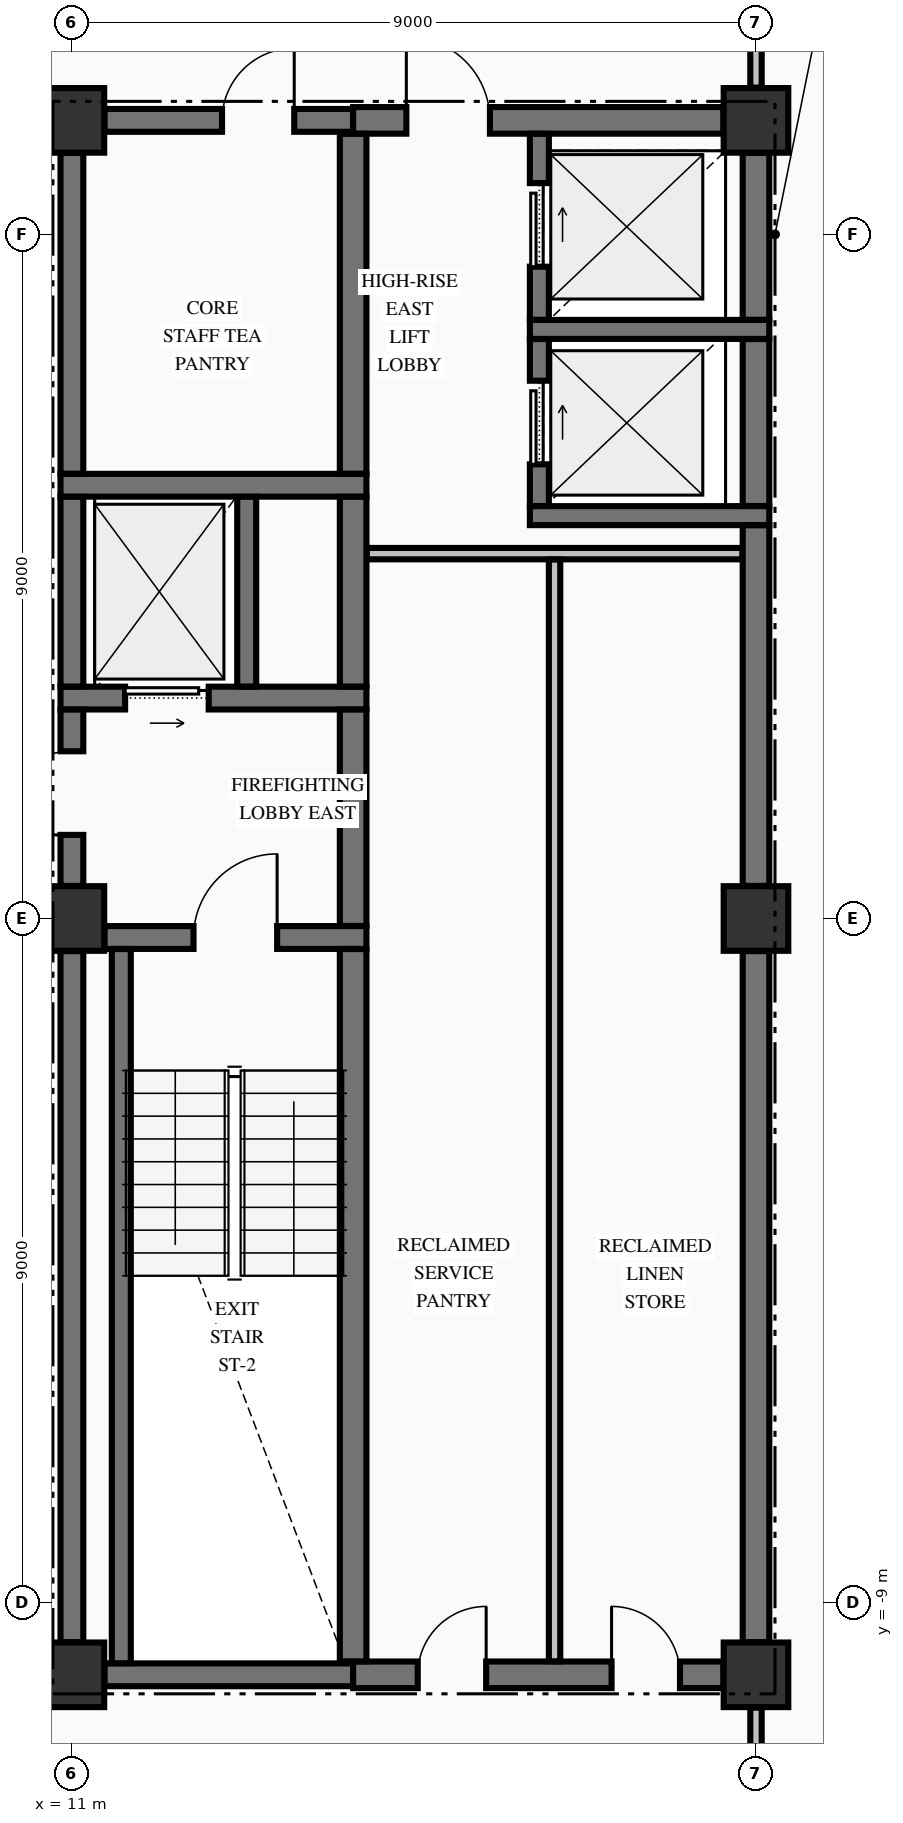
"""IFC4 building model, lengths in metres.
Left out: names, types, materials, properties, quantities, classifications, styles, units other than length and angle.
Written with IfcOpenShell. Run it as: python <this file> out.ifc"""

import sys

from ifc_helpers import new_model, si_unit, direction, frame, frame_2d, origin, origin_2d, place, context, subcontext, project, spatial, rectangle, extrude, element, fill, save


model = new_model("IFC4")
c1 = context("Model", 3, precision=1e-05, world=origin(), true_north=direction((0.0, 1.0)))
c2 = subcontext(c1, "Body", "Model", "MODEL_VIEW")
j1 = project(units=[si_unit("LENGTHUNIT", "METRE"), si_unit("PLANEANGLEUNIT", "RADIAN")], contexts=[c1])
p1 = place(None, origin())
s1 = spatial("IfcSite", under=j1, at=p1, CompositionType="ELEMENT")
p2 = place(p1, origin())
s2 = spatial("IfcBuilding", under=s1, at=p2, CompositionType="ELEMENT")
p3 = place(p2, frame((0.0, 0.0, 198.26)))
s3 = spatial("IfcBuildingStorey", under=s2, at=p3, CompositionType="ELEMENT", Elevation=198.26)
for number, where, z_axis, x_axis in (
    (1, (11.0, -9.95, -0.25), (0.0, 0.0, 1.0), (1.0, 0.0, 0.0)),
    (2, (11.0, 0.0, -0.25), (0.0, 0.0, 1.0), (1.0, 0.0, 0.0)),
    (3, (11.0, 10.5, -0.25), (0.0, 0.0, 1.0), (1.0, 0.0, 0.0)),
    (4, (20.0, -9.95, -0.25), (0.0, 0.0, 1.0), (1.0, 0.0, 0.0)),
    (5, (20.0, 10.5, -0.25), (0.0, 0.0, 1.0), (1.0, 0.0, 0.0)),
    (6, (20.0, 0.0, -0.25), (0.0, 0.0, 1.0), (1.0, 0.0, 0.0)),
):
    element("IfcColumn", number, at=place(p3, frame(where, z_axis=z_axis, x_axis=x_axis)), inside=s3, PredefinedType="COLUMN", context=c2, shape_type="SweptSolid", body=[
        extrude(rectangle(XDim=0.85, YDim=0.85, at=origin_2d()), origin(), (0.0, 0.0, 1.0), 3.4),
    ])
p4 = place(p3, frame((11.429, -9.95, 0.0), z_axis=(0.0, 0.0, 1.0), x_axis=(1.0, 0.0, 0.0)))
e7 = element("IfcWall", 7, at=p4, inside=s3, PredefinedType="SHEAR", context=c2, shape_type="SweptSolid", body=[
    extrude(rectangle(XDim=3.271, YDim=0.3, at=frame_2d((1.635, 0.0))), origin(), (0.0, 0.0, 1.0), 3.15),
])
p5 = place(p3, frame((14.7, -9.95, 0.0), z_axis=(0.0, 0.0, 1.0), x_axis=(1.0, 0.0, 0.0)))
e8 = element("IfcWall", 8, at=p5, inside=s3, PredefinedType="SHEAR", context=c2, shape_type="SweptSolid", body=[
    extrude(rectangle(XDim=4.871, YDim=0.35, at=frame_2d((2.436, 0.0))), origin(), (0.0, 0.0, 1.0), 3.15),
])
p6 = place(p5, frame((0.85, 0.0, 0.0)))
e9 = element("IfcOpeningElement", 9, at=p6, cuts=e8, PredefinedType="OPENING", context=c2, shape_type="SweptSolid", body=[
    extrude(rectangle(XDim=0.9, YDim=2.15, at=frame_2d((0.45, 1.075))), frame((0.0, 0.185, 0.0), z_axis=(0.0, -1.0, 0.0), x_axis=(1.0, 0.0, 0.0)), (0.0, 0.0, 1.0), 0.37),
])
p7 = place(p5, frame((3.4, 0.0, 0.0)))
e10 = element("IfcOpeningElement", 10, at=p7, cuts=e8, PredefinedType="OPENING", context=c2, shape_type="SweptSolid", body=[
    extrude(rectangle(XDim=0.9, YDim=2.15, at=frame_2d((0.45, 1.075))), frame((0.0, 0.185, 0.0), z_axis=(0.0, -1.0, 0.0), x_axis=(1.0, 0.0, 0.0)), (0.0, 0.0, 1.0), 0.37),
])
p8 = place(p3, frame((11.429, -0.25, 0.0), z_axis=(0.0, 0.0, 1.0), x_axis=(1.0, 0.0, 0.0)))
e11 = element("IfcWall", 11, at=p8, inside=s3, PredefinedType="SHEAR", context=c2, shape_type="SweptSolid", body=[
    extrude(rectangle(XDim=3.446, YDim=0.3, at=frame_2d((1.723, 0.0))), origin(), (0.0, 0.0, 1.0), 3.15),
])
p9 = place(p8, frame((1.171, 0.0, 0.0)))
e12 = element("IfcOpeningElement", 12, at=p9, cuts=e11, PredefinedType="OPENING", context=c2, shape_type="SweptSolid", body=[
    extrude(rectangle(XDim=1.1, YDim=2.15, at=frame_2d((0.55, 1.075))), frame((0.0, 0.16, 0.0), z_axis=(0.0, -1.0, 0.0), x_axis=(1.0, 0.0, 0.0)), (0.0, 0.0, 1.0), 0.32),
])
p10 = place(p3, frame((10.85, 2.9, 0.0), z_axis=(0.0, 0.0, 1.0), x_axis=(1.0, 0.0, 0.0)))
e13 = element("IfcWall", 13, at=p10, inside=s3, PredefinedType="SHEAR", context=c2, shape_type="SweptSolid", body=[
    extrude(rectangle(XDim=4.025, YDim=0.3, at=frame_2d((2.012, 0.0))), origin(), (0.0, 0.0, 1.0), 3.15),
])
p11 = place(p10, frame((0.85, 0.0, 0.0)))
e14 = element("IfcOpeningElement", 14, at=p11, cuts=e13, PredefinedType="OPENING", context=c2, shape_type="SweptSolid", body=[
    extrude(rectangle(XDim=1.1, YDim=2.2, at=frame_2d((0.55, 1.1))), frame((0.0, 0.16, 0.0), z_axis=(0.0, -1.0, 0.0), x_axis=(1.0, 0.0, 0.0)), (0.0, 0.0, 1.0), 0.32),
])
p12 = place(p3, frame((17.025, 5.3, 0.0), z_axis=(0.0, 0.0, 1.0), x_axis=(1.0, 0.0, 0.0)))
e15 = element("IfcWall", 15, at=p12, inside=s3, PredefinedType="SOLIDWALL", context=c2, shape_type="SweptSolid", body=[
    extrude(rectangle(XDim=3.15, YDim=0.25, at=frame_2d((1.575, 0.0))), origin(), (0.0, 0.0, 1.0), 3.15),
])
p13 = place(p3, frame((10.85, 5.7, 0.0), z_axis=(0.0, 0.0, 1.0), x_axis=(1.0, 0.0, 0.0)))
e16 = element("IfcWall", 16, at=p13, inside=s3, PredefinedType="SHEAR", context=c2, shape_type="SweptSolid", body=[
    extrude(rectangle(XDim=4.025, YDim=0.3, at=frame_2d((2.012, 0.0))), origin(), (0.0, 0.0, 1.0), 3.15),
])
p14 = place(p3, frame((17.025, 7.75, 0.0), z_axis=(0.0, 0.0, 1.0), x_axis=(1.0, 0.0, 0.0)))
e17 = element("IfcWall", 17, at=p14, inside=s3, PredefinedType="SOLIDWALL", context=c2, shape_type="SweptSolid", body=[
    extrude(rectangle(XDim=3.15, YDim=0.25, at=frame_2d((1.575, 0.0))), origin(), (0.0, 0.0, 1.0), 3.15),
])
p15 = place(p3, frame((11.429, 10.5, 0.0), z_axis=(0.0, 0.0, 1.0), x_axis=(1.0, 0.0, 0.0)))
e18 = element("IfcWall", 18, at=p15, inside=s3, PredefinedType="SHEAR", context=c2, shape_type="SweptSolid", body=[
    extrude(rectangle(XDim=3.271, YDim=0.3, at=frame_2d((1.635, 0.0))), origin(), (0.0, 0.0, 1.0), 3.15),
])
p16 = place(p15, frame((1.546, 0.0, 0.0)))
e19 = element("IfcOpeningElement", 19, at=p16, cuts=e18, PredefinedType="OPENING", context=c2, shape_type="SweptSolid", body=[
    extrude(rectangle(XDim=0.95, YDim=2.15, at=frame_2d((0.475, 1.075))), frame((0.0, 0.16, 0.0), z_axis=(0.0, -1.0, 0.0), x_axis=(1.0, 0.0, 0.0)), (0.0, 0.0, 1.0), 0.32),
])
p17 = place(p3, frame((14.7, 10.5, 0.0), z_axis=(0.0, 0.0, 1.0), x_axis=(1.0, 0.0, 0.0)))
e20 = element("IfcWall", 20, at=p17, inside=s3, PredefinedType="SHEAR", context=c2, shape_type="SweptSolid", body=[
    extrude(rectangle(XDim=4.871, YDim=0.35, at=frame_2d((2.436, 0.0))), origin(), (0.0, 0.0, 1.0), 3.15),
])
p18 = place(p17, frame((0.7, 0.0, 0.0)))
e21 = element("IfcOpeningElement", 21, at=p18, cuts=e20, PredefinedType="OPENING", context=c2, shape_type="SweptSolid", body=[
    extrude(rectangle(XDim=1.1, YDim=2.15, at=frame_2d((0.55, 1.075))), frame((0.0, 0.185, 0.0), z_axis=(0.0, -1.0, 0.0), x_axis=(1.0, 0.0, 0.0)), (0.0, 0.0, 1.0), 0.37),
])
p19 = place(p3, frame((14.878, 4.8, 0.0), z_axis=(0.0, 0.0, 1.0), x_axis=(1.0, 0.0, 0.0)))
e22 = element("IfcWall", 22, at=p19, inside=s3, PredefinedType="PARTITIONING", context=c2, shape_type="SweptSolid", body=[
    extrude(rectangle(XDim=4.944, YDim=0.15, at=frame_2d((2.472, 0.0))), origin(), (0.0, 0.0, 1.0), 3.15),
])
p20 = place(p3, frame((11.0, -9.521, 0.0), z_axis=(0.0, 0.0, 1.0), x_axis=(0.0, 1.0, 0.0)))
e23 = element("IfcWall", 23, at=p20, inside=s3, PredefinedType="SHEAR", context=c2, shape_type="SweptSolid", body=[
    extrude(rectangle(XDim=9.092, YDim=0.3, at=frame_2d((4.546, 0.0))), origin(), (0.0, 0.0, 1.0), 3.15),
])
p21 = place(p3, frame((11.0, 0.429, 0.0), z_axis=(0.0, 0.0, 1.0), x_axis=(0.0, 1.0, 0.0)))
e24 = element("IfcWall", 24, at=p21, inside=s3, PredefinedType="SHEAR", context=c2, shape_type="SweptSolid", body=[
    extrude(rectangle(XDim=2.319, YDim=0.3, at=frame_2d((1.16, 0.0))), origin(), (0.0, 0.0, 1.0), 3.15),
])
p22 = place(p21, frame((0.671, 0.0, 0.0)))
e25 = element("IfcOpeningElement", 25, at=p22, cuts=e24, PredefinedType="OPENING", context=c2, shape_type="SweptSolid", body=[
    extrude(rectangle(XDim=1.1, YDim=2.15, at=frame_2d((0.55, 1.075))), frame((0.0, 0.16, 0.0), z_axis=(0.0, -1.0, 0.0), x_axis=(1.0, 0.0, 0.0)), (0.0, 0.0, 1.0), 0.32),
])
p23 = place(p3, frame((11.0, 3.052, 0.0), z_axis=(0.0, 0.0, 1.0), x_axis=(0.0, 1.0, 0.0)))
e26 = element("IfcWall", 26, at=p23, inside=s3, PredefinedType="SHEAR", context=c2, shape_type="SweptSolid", body=[
    extrude(rectangle(XDim=2.496, YDim=0.3, at=frame_2d((1.248, 0.0))), origin(), (0.0, 0.0, 1.0), 3.15),
])
p24 = place(p3, frame((11.0, 5.852, 0.0), z_axis=(0.0, 0.0, 1.0), x_axis=(0.0, 1.0, 0.0)))
e27 = element("IfcWall", 27, at=p24, inside=s3, PredefinedType="SHEAR", context=c2, shape_type="SweptSolid", body=[
    extrude(rectangle(XDim=4.219, YDim=0.3, at=frame_2d((2.109, 0.0))), origin(), (0.0, 0.0, 1.0), 3.15),
])
p25 = place(p3, frame((11.65, -9.798, 0.0), z_axis=(0.0, 0.0, 1.0), x_axis=(0.0, 1.0, 0.0)))
e28 = element("IfcWall", 28, at=p25, inside=s3, PredefinedType="SOLIDWALL", context=c2, shape_type="SweptSolid", body=[
    extrude(rectangle(XDim=9.396, YDim=0.25, at=frame_2d((4.698, 0.0))), origin(), (0.0, 0.0, 1.0), 3.15),
])
p26 = place(p3, frame((13.3, 3.052, 0.0), z_axis=(0.0, 0.0, 1.0), x_axis=(0.0, 1.0, 0.0)))
e29 = element("IfcWall", 29, at=p26, inside=s3, PredefinedType="SOLIDWALL", context=c2, shape_type="SweptSolid", body=[
    extrude(rectangle(XDim=2.496, YDim=0.25, at=frame_2d((1.248, 0.0))), origin(), (0.0, 0.0, 1.0), 3.15),
])
p27 = place(p3, frame((14.7, -9.773, 0.0), z_axis=(0.0, 0.0, 1.0), x_axis=(0.0, 1.0, 0.0)))
e30 = element("IfcWall", 30, at=p27, inside=s3, PredefinedType="SHEAR", context=c2, shape_type="SweptSolid", body=[
    extrude(rectangle(XDim=9.371, YDim=0.35, at=frame_2d((4.686, 0.0))), origin(), (0.0, 0.0, 1.0), 3.15),
])
p28 = place(p3, frame((14.7, -0.098, 0.0), z_axis=(0.0, 0.0, 1.0), x_axis=(0.0, 1.0, 0.0)))
e31 = element("IfcWall", 31, at=p28, inside=s3, PredefinedType="SHEAR", context=c2, shape_type="SweptSolid", body=[
    extrude(rectangle(XDim=2.846, YDim=0.35, at=frame_2d((1.423, 0.0))), origin(), (0.0, 0.0, 1.0), 3.15),
])
p29 = place(p3, frame((14.7, 3.052, 0.0), z_axis=(0.0, 0.0, 1.0), x_axis=(0.0, 1.0, 0.0)))
e32 = element("IfcWall", 32, at=p29, inside=s3, PredefinedType="SHEAR", context=c2, shape_type="SweptSolid", body=[
    extrude(rectangle(XDim=2.496, YDim=0.35, at=frame_2d((1.248, 0.0))), origin(), (0.0, 0.0, 1.0), 3.15),
])
p30 = place(p3, frame((14.7, 5.852, 0.0), z_axis=(0.0, 0.0, 1.0), x_axis=(0.0, 1.0, 0.0)))
e33 = element("IfcWall", 33, at=p30, inside=s3, PredefinedType="SHEAR", context=c2, shape_type="SweptSolid", body=[
    extrude(rectangle(XDim=4.471, YDim=0.35, at=frame_2d((2.235, 0.0))), origin(), (0.0, 0.0, 1.0), 3.15),
])
p31 = place(p3, frame((17.15, 5.427, 0.0), z_axis=(0.0, 0.0, 1.0), x_axis=(0.0, 1.0, 0.0)))
e34 = element("IfcWall", 34, at=p31, inside=s3, PredefinedType="SOLIDWALL", context=c2, shape_type="SweptSolid", body=[
    extrude(rectangle(XDim=2.196, YDim=0.25, at=frame_2d((1.098, 0.0))), origin(), (0.0, 0.0, 1.0), 3.15),
])
p32 = place(p31, frame((0.548, 0.0, 0.0)))
e35 = element("IfcOpeningElement", 35, at=p32, cuts=e34, PredefinedType="OPENING", context=c2, shape_type="SweptSolid", body=[
    extrude(rectangle(XDim=1.1, YDim=2.2, at=frame_2d((0.55, 1.1))), frame((0.0, 0.135, 0.0), z_axis=(0.0, -1.0, 0.0), x_axis=(1.0, 0.0, 0.0)), (0.0, 0.0, 1.0), 0.27),
])
p33 = place(p3, frame((17.15, 7.877, 0.0), z_axis=(0.0, 0.0, 1.0), x_axis=(0.0, 1.0, 0.0)))
e36 = element("IfcWall", 36, at=p33, inside=s3, PredefinedType="SOLIDWALL", context=c2, shape_type="SweptSolid", body=[
    extrude(rectangle(XDim=2.446, YDim=0.25, at=frame_2d((1.223, 0.0))), origin(), (0.0, 0.0, 1.0), 3.15),
])
p34 = place(p33, frame((0.698, 0.0, 0.0)))
e37 = element("IfcOpeningElement", 37, at=p34, cuts=e36, PredefinedType="OPENING", context=c2, shape_type="SweptSolid", body=[
    extrude(rectangle(XDim=1.1, YDim=2.2, at=frame_2d((0.55, 1.1))), frame((0.0, 0.135, 0.0), z_axis=(0.0, -1.0, 0.0), x_axis=(1.0, 0.0, 0.0)), (0.0, 0.0, 1.0), 0.27),
])
p35 = place(p3, frame((20.0, -9.521, 0.0), z_axis=(0.0, 0.0, 1.0), x_axis=(0.0, 1.0, 0.0)))
e38 = element("IfcWall", 38, at=p35, inside=s3, PredefinedType="SHEAR", context=c2, shape_type="SweptSolid", body=[
    extrude(rectangle(XDim=9.092, YDim=0.35, at=frame_2d((4.546, 0.0))), origin(), (0.0, 0.0, 1.0), 3.15),
])
p36 = place(p3, frame((20.0, 0.429, 0.0), z_axis=(0.0, 0.0, 1.0), x_axis=(0.0, 1.0, 0.0)))
e39 = element("IfcWall", 39, at=p36, inside=s3, PredefinedType="SHEAR", context=c2, shape_type="SweptSolid", body=[
    extrude(rectangle(XDim=4.744, YDim=0.35, at=frame_2d((2.372, 0.0))), origin(), (0.0, 0.0, 1.0), 3.15),
])
p37 = place(p3, frame((20.0, 5.427, 0.0), z_axis=(0.0, 0.0, 1.0), x_axis=(0.0, 1.0, 0.0)))
e40 = element("IfcWall", 40, at=p37, inside=s3, PredefinedType="SHEAR", context=c2, shape_type="SweptSolid", body=[
    extrude(rectangle(XDim=2.196, YDim=0.35, at=frame_2d((1.098, 0.0))), origin(), (0.0, 0.0, 1.0), 3.15),
])
p38 = place(p3, frame((20.0, 7.877, 0.0), z_axis=(0.0, 0.0, 1.0), x_axis=(0.0, 1.0, 0.0)))
e41 = element("IfcWall", 41, at=p38, inside=s3, PredefinedType="SHEAR", context=c2, shape_type="SweptSolid", body=[
    extrude(rectangle(XDim=2.194, YDim=0.35, at=frame_2d((1.097, 0.0))), origin(), (0.0, 0.0, 1.0), 3.15),
])
p39 = place(p3, frame((17.35, -9.772, 0.0), z_axis=(0.0, 0.0, 1.0), x_axis=(0.0, 1.0, 0.0)))
e42 = element("IfcWall", 42, at=p39, inside=s3, PredefinedType="PARTITIONING", context=c2, shape_type="SweptSolid", body=[
    extrude(rectangle(XDim=14.494, YDim=0.15, at=frame_2d((7.247, 0.0))), origin(), (0.0, 0.0, 1.0), 3.15),
])
p40 = place(p3, frame((20.0, -12.472, 0.0), z_axis=(0.0, 0.0, 1.0), x_axis=(0.0, 1.0, 0.0)))
e43 = element("IfcWall", 43, at=p40, inside=s3, PredefinedType="PARTITIONING", context=c2, shape_type="SweptSolid", body=[
    extrude(rectangle(XDim=2.091, YDim=0.15, at=frame_2d((1.045, 0.0))), origin(), (0.0, 0.0, 1.0), 2.342),
])
p41 = place(p3, frame((20.0, 10.931, 0.0), z_axis=(0.0, 0.0, 1.0), x_axis=(0.0, 1.0, 0.0)))
e44 = element("IfcWall", 44, at=p41, inside=s3, PredefinedType="PARTITIONING", context=c2, shape_type="SweptSolid", body=[
    extrude(rectangle(XDim=1.741, YDim=0.15, at=frame_2d((0.871, 0.0))), origin(), (0.0, 0.0, 1.0), 2.342),
])
p42 = place(p9, origin())
e45 = element("IfcDoor", 45, at=p42, inside=s3, OperationType="SINGLE_SWING_RIGHT", PredefinedType="DOOR", context=c2, shape_type="SweptSolid", body=[
    extrude(rectangle(XDim=1.1, YDim=2.15, at=frame_2d((0.55, 1.075))), frame((0.0, 0.025, 0.0), z_axis=(0.0, -1.0, 0.0), x_axis=(1.0, 0.0, 0.0)), (0.0, 0.0, 1.0), 0.05),
])
fill(e12, e45)
p43 = place(p22, origin())
e46 = element("IfcDoor", 46, at=p43, inside=s3, OperationType="SINGLE_SWING_LEFT", PredefinedType="DOOR", context=c2, shape_type="SweptSolid", body=[
    extrude(rectangle(XDim=1.1, YDim=2.15, at=frame_2d((0.55, 1.075))), frame((0.0, 0.025, 0.0), z_axis=(0.0, -1.0, 0.0), x_axis=(1.0, 0.0, 0.0)), (0.0, 0.0, 1.0), 0.05),
])
fill(e25, e46)
p44 = place(p11, origin())
e47 = element("IfcDoor", 47, at=p44, inside=s3, OperationType="SLIDING_TO_RIGHT", PredefinedType="DOOR", context=c2, shape_type="SweptSolid", body=[
    extrude(rectangle(XDim=1.1, YDim=2.2, at=frame_2d((0.55, 1.1))), frame((0.0, 0.025, 0.0), z_axis=(0.0, -1.0, 0.0), x_axis=(1.0, 0.0, 0.0)), (0.0, 0.0, 1.0), 0.05),
])
fill(e14, e47)
p45 = place(p16, origin())
e48 = element("IfcDoor", 48, at=p45, inside=s3, OperationType="SINGLE_SWING_RIGHT", PredefinedType="DOOR", context=c2, shape_type="SweptSolid", body=[
    extrude(rectangle(XDim=0.95, YDim=2.15, at=frame_2d((0.475, 1.075))), frame((0.0, 0.025, 0.0), z_axis=(0.0, -1.0, 0.0), x_axis=(1.0, 0.0, 0.0)), (0.0, 0.0, 1.0), 0.05),
])
fill(e19, e48)
p46 = place(p32, origin())
e49 = element("IfcDoor", 49, at=p46, inside=s3, OperationType="SLIDING_TO_RIGHT", PredefinedType="DOOR", context=c2, shape_type="SweptSolid", body=[
    extrude(rectangle(XDim=1.1, YDim=2.2, at=frame_2d((0.55, 1.1))), frame((0.0, 0.025, 0.0), z_axis=(0.0, -1.0, 0.0), x_axis=(1.0, 0.0, 0.0)), (0.0, 0.0, 1.0), 0.05),
])
fill(e35, e49)
p47 = place(p34, origin())
e50 = element("IfcDoor", 50, at=p47, inside=s3, OperationType="SLIDING_TO_RIGHT", PredefinedType="DOOR", context=c2, shape_type="SweptSolid", body=[
    extrude(rectangle(XDim=1.1, YDim=2.2, at=frame_2d((0.55, 1.1))), frame((0.0, 0.025, 0.0), z_axis=(0.0, -1.0, 0.0), x_axis=(1.0, 0.0, 0.0)), (0.0, 0.0, 1.0), 0.05),
])
fill(e37, e50)
p48 = place(p18, origin())
e51 = element("IfcDoor", 51, at=p48, inside=s3, OperationType="SINGLE_SWING_LEFT", PredefinedType="DOOR", context=c2, shape_type="SweptSolid", body=[
    extrude(rectangle(XDim=1.1, YDim=2.15, at=frame_2d((0.55, 1.075))), frame((0.0, 0.025, 0.0), z_axis=(0.0, -1.0, 0.0), x_axis=(1.0, 0.0, 0.0)), (0.0, 0.0, 1.0), 0.05),
])
fill(e21, e51)
p49 = place(p6, origin())
e52 = element("IfcDoor", 52, at=p49, inside=s3, OperationType="SINGLE_SWING_RIGHT", PredefinedType="DOOR", context=c2, shape_type="SweptSolid", body=[
    extrude(rectangle(XDim=0.9, YDim=2.15, at=frame_2d((0.45, 1.075))), frame((0.0, 0.025, 0.0), z_axis=(0.0, -1.0, 0.0), x_axis=(1.0, 0.0, 0.0)), (0.0, 0.0, 1.0), 0.05),
])
fill(e9, e52)
p50 = place(p7, origin())
e53 = element("IfcDoor", 53, at=p50, inside=s3, OperationType="SINGLE_SWING_LEFT", PredefinedType="DOOR", context=c2, shape_type="SweptSolid", body=[
    extrude(rectangle(XDim=0.9, YDim=2.15, at=frame_2d((0.45, 1.075))), frame((0.0, 0.025, 0.0), z_axis=(0.0, -1.0, 0.0), x_axis=(1.0, 0.0, 0.0)), (0.0, 0.0, 1.0), 0.05),
])
fill(e10, e53)
save(model, sys.argv[1])
